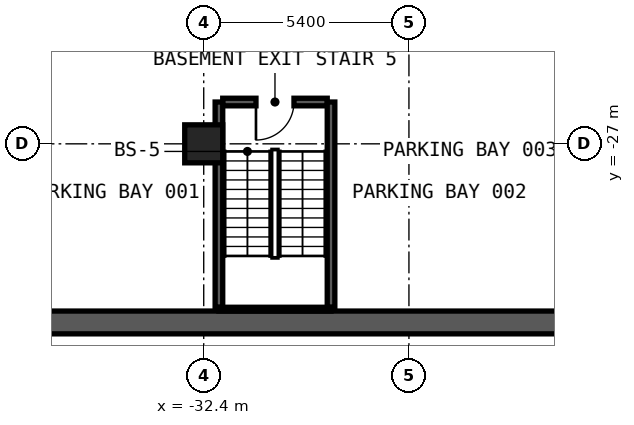
"""IFC4 building model, lengths in metres.
Left out: names, types, materials, properties, quantities, classifications, styles, units other than length and angle.
Written with IfcOpenShell. Run it as: python <this file> out.ifc"""

import sys

from ifc_helpers import new_model, si_unit, direction, frame, frame_2d, origin, origin_2d, place, context, subcontext, project, spatial, rectangle, extrude, element, fill, save


model = new_model("IFC4")
c1 = context("Model", 3, precision=1e-05, world=origin(), true_north=direction((0.0, 1.0)))
c2 = subcontext(c1, "Body", "Model", "MODEL_VIEW")
j1 = project(units=[si_unit("LENGTHUNIT", "METRE"), si_unit("PLANEANGLEUNIT", "RADIAN")], contexts=[c1])
p1 = place(None, origin())
s1 = spatial("IfcSite", under=j1, at=p1, CompositionType="ELEMENT")
p2 = place(p1, origin())
s2 = spatial("IfcBuilding", under=s1, at=p2, CompositionType="ELEMENT")
p3 = place(p2, frame((0.0, 0.0, -8.4)))
s3 = spatial("IfcBuildingStorey", under=s2, at=p3, CompositionType="ELEMENT", Elevation=-8.4)
p4 = place(p3, frame((-48.0, -31.7, -0.35), z_axis=(0.0, 0.0, 1.0), x_axis=(1.0, 0.0, 0.0)))
e1 = element("IfcWall", 1, at=p4, inside=s3, PredefinedType="SOLIDWALL", context=c2, shape_type="SweptSolid", body=[
    extrude(rectangle(XDim=96.0, YDim=0.6, at=frame_2d((48.0, 0.0))), origin(), (0.0, 0.0, 1.0), 4.55),
])
p5 = place(p3, frame((-32.4, -27.0, -0.35), z_axis=(0.0, 0.0, 1.0), x_axis=(1.0, 0.0, 0.0)))
e2 = element("IfcColumn", 2, at=p5, inside=s3, PredefinedType="COLUMN", context=c2, shape_type="SweptSolid", body=[
    extrude(rectangle(XDim=1.0, YDim=1.0, at=origin_2d()), origin(), (0.0, 0.0, 1.0), 4.55),
])
p6 = place(p3, frame((-31.9, -25.9, 0.0), z_axis=(0.0, 0.0, 1.0), x_axis=(1.0, 0.0, 0.0)))
e3 = element("IfcWall", 3, at=p6, inside=s3, PredefinedType="SOLIDWALL", context=c2, shape_type="SweptSolid", body=[
    extrude(rectangle(XDim=2.75, YDim=0.2, at=frame_2d((1.375, 0.0))), origin(), (0.0, 0.0, 1.0), 3.85),
])
p7 = place(p6, frame((1.875, 0.0, 0.0), z_axis=(0.0, 0.0, 1.0), x_axis=(-1.0, 0.0, 0.0)))
e4 = element("IfcOpeningElement", 4, at=p7, cuts=e3, PredefinedType="OPENING", context=c2, shape_type="SweptSolid", body=[
    extrude(rectangle(XDim=1.0, YDim=2.1, at=frame_2d((0.5, 1.05))), frame((0.0, 0.11, 0.0), z_axis=(0.0, -1.0, 0.0), x_axis=(1.0, 0.0, 0.0)), (0.0, 0.0, 1.0), 0.22),
])
for number, where, z_axis, x_axis in (
    (5, (-32.0, -31.3, 0.0), (0.0, 0.0, 1.0), (0.0, 1.0, 0.0)),
    (6, (-29.05, -31.3, 0.0), (0.0, 0.0, 1.0), (0.0, 1.0, 0.0)),
):
    element("IfcWall", number, at=place(p3, frame(where, z_axis=z_axis, x_axis=x_axis)), inside=s3, PredefinedType="SOLIDWALL", context=c2, shape_type="SweptSolid", body=[
        extrude(rectangle(XDim=5.4, YDim=0.2, at=frame_2d((2.7, 0.0))), origin(), (0.0, 0.0, 1.0), 3.85),
    ])
p8 = place(p3, frame((-32.0, -31.35, 0.0), z_axis=(0.0, 0.0, 1.0), x_axis=(1.0, 0.0, 0.0)))
e7 = element("IfcWall", 7, at=p8, inside=s3, PredefinedType="SOLIDWALL", context=c2, shape_type="SweptSolid", body=[
    extrude(rectangle(XDim=2.95, YDim=0.1, at=frame_2d((1.475, 0.0))), origin(), (0.0, 0.0, 1.0), 3.85),
])
p9 = place(p7, origin())
e8 = element("IfcDoor", 8, at=p9, inside=s3, OperationType="SINGLE_SWING_RIGHT", PredefinedType="DOOR", context=c2, shape_type="SweptSolid", body=[
    extrude(rectangle(XDim=1.0, YDim=2.1, at=frame_2d((0.5, 1.05))), frame((0.0, 0.025, 0.0), z_axis=(0.0, -1.0, 0.0), x_axis=(1.0, 0.0, 0.0)), (0.0, 0.0, 1.0), 0.05),
])
fill(e4, e8)
save(model, sys.argv[1])
